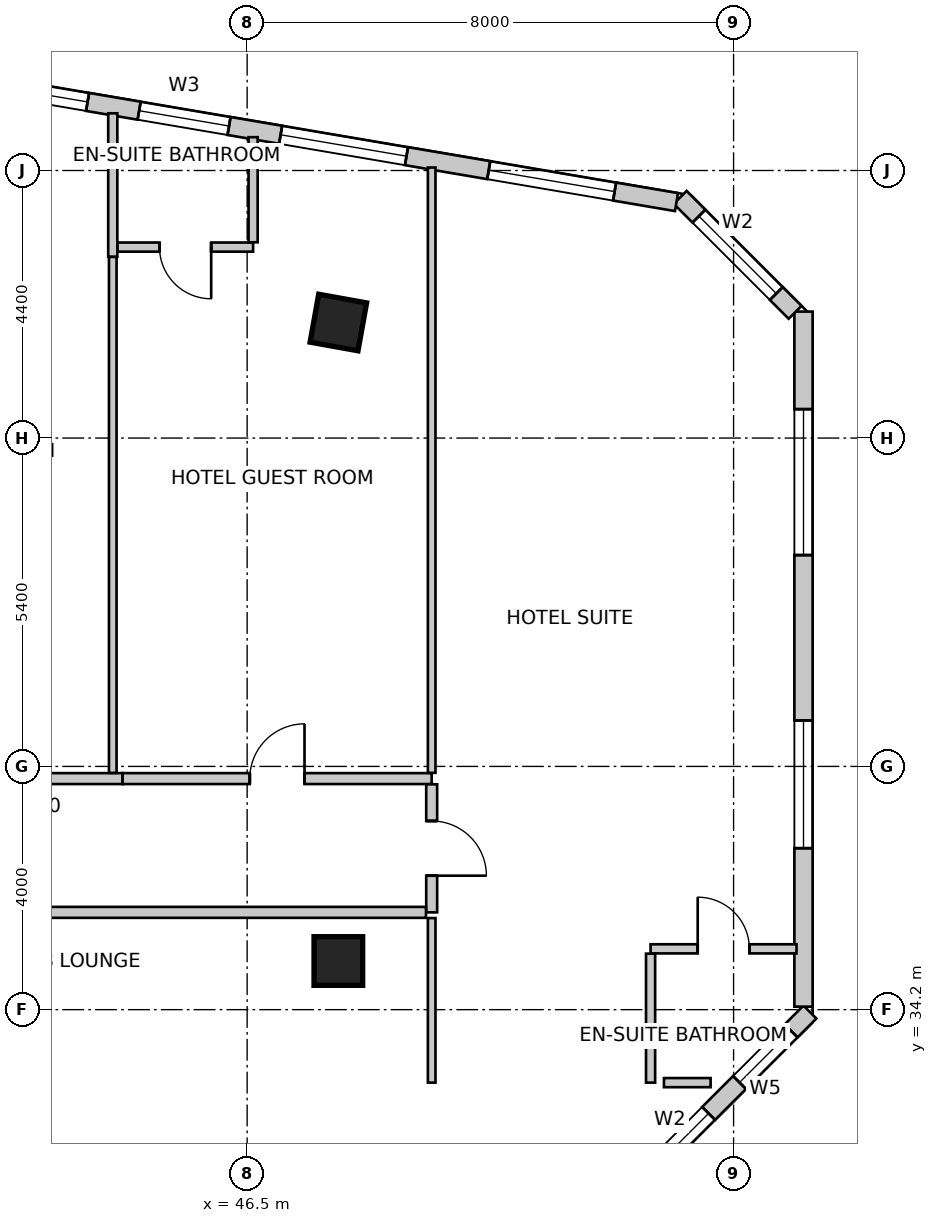
"""IFC4 building model, lengths in metres.
Left out: names, types, materials, properties, quantities, classifications, styles, units other than length and angle.
Written with IfcOpenShell. Run it as: python <this file> out.ifc"""

import sys

from ifc_helpers import new_model, si_unit, direction, frame, frame_2d, origin, origin_2d, place, context, subcontext, project, spatial, rectangle, extrude, source, transform, mapped, element, fill, save


model = new_model("IFC4")
c1 = context("Model", 3, precision=1e-05, world=origin(), true_north=direction((0.0, 1.0)))
c2 = subcontext(c1, "Body", "Model", "MODEL_VIEW")
j1 = project(units=[si_unit("LENGTHUNIT", "METRE"), si_unit("PLANEANGLEUNIT", "RADIAN")], contexts=[c1])
p1 = place(None, origin())
s1 = spatial("IfcSite", under=j1, at=p1, CompositionType="ELEMENT")
p2 = place(p1, origin())
s2 = spatial("IfcBuilding", under=s1, at=p2, CompositionType="ELEMENT")
p3 = place(p2, frame((0.0, 0.0, 114.2)))
s3 = spatial("IfcBuildingStorey", under=s2, at=p3, CompositionType="ELEMENT", Elevation=114.2)
m1 = source(origin(), c2, "Body", "SweptSolid", [
    extrude(rectangle(XDim=0.8, YDim=0.8, at=origin_2d()), origin(), (0.0, 0.0, 1.0), 3.6),
])
for number, where, z_axis, x_axis in (
    (1, (48.0, 45.5, 0.0), (0.0, 0.0, 1.0), (0.984, -0.177, 0.0)),
    (2, (48.0, 35.0, 0.0), (0.0, 0.0, 1.0), (1.0, 0.0, 0.0)),
):
    element("IfcColumn", number, at=place(p3, frame(where, z_axis=z_axis, x_axis=x_axis)), inside=s3, PredefinedType="COLUMN", context=c2, shape_type="MappedRepresentation", body=[
        mapped(m1, transform((0.0, 0.0, 0.0), scale=1.0)),
    ])
p4 = place(p3, frame((52.476, 30.88, 0.0), z_axis=(0.0, 0.0, 1.0), x_axis=(0.707106781187, 0.707106781187, 0.0)))
e3 = element("IfcWall", 3, at=p4, inside=s3, PredefinedType="SOLIDWALL", context=c2, shape_type="SweptSolid", body=[
    extrude(rectangle(XDim=4.639, YDim=0.3, at=frame_2d((2.319, 0.0))), origin(), (0.0, 0.0, 1.0), 3.35),
])
m2 = source(origin(), c2, "Body", "SweptSolid", [
    extrude(rectangle(XDim=1.8, YDim=2.1, at=frame_2d((0.9, 1.05))), frame((0.0, 0.16, 0.0), z_axis=(0.0, -1.0, 0.0), x_axis=(1.0, 0.0, 0.0)), (0.0, 0.0, 1.0), 0.32),
])
p5 = place(p4, frame((0.482, 0.0, 0.85)))
e4 = element("IfcOpeningElement", 4, at=p5, cuts=e3, PredefinedType="OPENING", context=c2, shape_type="MappedRepresentation", body=[
    mapped(m2, transform((0.0, 0.0, 0.0), scale=1.0)),
])
m3 = source(origin(), c2, "Body", "SweptSolid", [
    extrude(rectangle(XDim=1.2, YDim=1.6, at=frame_2d((0.6, 0.8))), frame((0.0, 0.16, 0.0), z_axis=(0.0, -1.0, 0.0), x_axis=(1.0, 0.0, 0.0)), (0.0, 0.0, 1.0), 0.32),
])
p6 = place(p4, frame((3.001, 0.0, 0.85)))
e5 = element("IfcOpeningElement", 5, at=p6, cuts=e3, PredefinedType="OPENING", context=c2, shape_type="MappedRepresentation", body=[
    mapped(m3, transform((0.0, 0.0, 0.0), scale=1.0)),
])
p7 = place(p3, frame((55.65, 34.249, 0.0), z_axis=(0.0, 0.0, 1.0), x_axis=(0.0, 1.0, 0.0)))
e6 = element("IfcWall", 6, at=p7, inside=s3, PredefinedType="SOLIDWALL", context=c2, shape_type="SweptSolid", body=[
    extrude(rectangle(XDim=11.431, YDim=0.3, at=frame_2d((5.715, 0.0))), origin(), (0.0, 0.0, 1.0), 3.35),
])
m4 = source(origin(), c2, "Body", "SweptSolid", [
    extrude(rectangle(XDim=2.1, YDim=2.0, at=frame_2d((1.05, 1.0))), frame((0.0, 0.16, 0.0), z_axis=(0.0, -1.0, 0.0), x_axis=(1.0, 0.0, 0.0)), (0.0, 0.0, 1.0), 0.32),
])
p8 = place(p7, frame((2.606, 0.0, 0.85)))
e7 = element("IfcOpeningElement", 7, at=p8, cuts=e6, PredefinedType="OPENING", context=c2, shape_type="MappedRepresentation", body=[
    mapped(m4, transform((0.0, 0.0, 0.0), scale=1.0)),
])
m5 = source(origin(), c2, "Body", "SweptSolid", [
    extrude(rectangle(XDim=2.4, YDim=2.2, at=frame_2d((1.2, 1.1))), frame((0.0, 0.16, 0.0), z_axis=(0.0, -1.0, 0.0), x_axis=(1.0, 0.0, 0.0)), (0.0, 0.0, 1.0), 0.32),
])
p9 = place(p7, frame((7.426, 0.0, 0.85)))
e8 = element("IfcOpeningElement", 8, at=p9, cuts=e6, PredefinedType="OPENING", context=c2, shape_type="MappedRepresentation", body=[
    mapped(m5, transform((0.0, 0.0, 0.0), scale=1.0)),
])
p10 = place(p3, frame((55.512, 45.668, 0.0), z_axis=(0.0, 0.0, 1.0), x_axis=(-0.707152443695, 0.707061115729, 0.0)))
e9 = element("IfcWall", 9, at=p10, inside=s3, PredefinedType="SOLIDWALL", context=c2, shape_type="SweptSolid", body=[
    extrude(rectangle(XDim=2.673, YDim=0.3, at=frame_2d((1.337, 0.0))), origin(), (0.0, 0.0, 1.0), 3.35),
])
p11 = place(p10, frame((0.437, 0.0, 0.85)))
e10 = element("IfcOpeningElement", 10, at=p11, cuts=e9, PredefinedType="OPENING", context=c2, shape_type="MappedRepresentation", body=[
    mapped(m2, transform((0.0, 0.0, 0.0), scale=1.0)),
])
p12 = place(p3, frame((53.561, 47.48, 0.0), z_axis=(0.0, 0.0, 1.0), x_axis=(-0.985845173895, 0.167658262868, 0.0)))
e11 = element("IfcWall", 11, at=p12, inside=s3, PredefinedType="SOLIDWALL", context=c2, shape_type="SweptSolid", body=[
    extrude(rectangle(XDim=32.132, YDim=0.3, at=frame_2d((16.066, 0.0))), origin(), (0.0, 0.0, 1.0), 3.35),
])
p13 = place(p12, frame((1.032, 0.0, 0.85)))
e12 = element("IfcOpeningElement", 12, at=p13, cuts=e11, PredefinedType="OPENING", context=c2, shape_type="MappedRepresentation", body=[
    mapped(m4, transform((0.0, 0.0, 0.0), scale=1.0)),
])
p14 = place(p12, frame((4.504, 0.0, 0.85)))
e13 = element("IfcOpeningElement", 13, at=p14, cuts=e11, PredefinedType="OPENING", context=c2, shape_type="MappedRepresentation", body=[
    mapped(m4, transform((0.0, 0.0, 0.0), scale=1.0)),
])
m6 = source(origin(), c2, "Body", "SweptSolid", [
    extrude(rectangle(XDim=1.5, YDim=1.8, at=frame_2d((0.75, 0.9))), frame((0.0, 0.16, 0.0), z_axis=(0.0, -1.0, 0.0), x_axis=(1.0, 0.0, 0.0)), (0.0, 0.0, 1.0), 0.32),
])
p15 = place(p12, frame((7.464, 0.0, 0.85)))
e14 = element("IfcOpeningElement", 14, at=p15, cuts=e11, PredefinedType="OPENING", context=c2, shape_type="MappedRepresentation", body=[
    mapped(m6, transform((0.0, 0.0, 0.0), scale=1.0)),
])
p16 = place(p12, frame((9.824, 0.0, 0.85)))
e15 = element("IfcOpeningElement", 15, at=p16, cuts=e11, PredefinedType="OPENING", context=c2, shape_type="MappedRepresentation", body=[
    mapped(m4, transform((0.0, 0.0, 0.0), scale=1.0)),
])
p17 = place(p12, frame((12.784, 0.0, 0.85)))
e16 = element("IfcOpeningElement", 16, at=p17, cuts=e11, PredefinedType="OPENING", context=c2, shape_type="MappedRepresentation", body=[
    mapped(m6, transform((0.0, 0.0, 0.0), scale=1.0)),
])
p18 = place(p12, frame((15.144, 0.0, 0.85)))
e17 = element("IfcOpeningElement", 17, at=p18, cuts=e11, PredefinedType="OPENING", context=c2, shape_type="MappedRepresentation", body=[
    mapped(m4, transform((0.0, 0.0, 0.0), scale=1.0)),
])
p19 = place(p12, frame((18.086, 0.0, 0.85)))
e18 = element("IfcOpeningElement", 18, at=p19, cuts=e11, PredefinedType="OPENING", context=c2, shape_type="MappedRepresentation", body=[
    mapped(m6, transform((0.0, 0.0, 0.0), scale=1.0)),
])
p20 = place(p12, frame((20.459, 0.0, 0.85)))
e19 = element("IfcOpeningElement", 19, at=p20, cuts=e11, PredefinedType="OPENING", context=c2, shape_type="MappedRepresentation", body=[
    mapped(m4, transform((0.0, 0.0, 0.0), scale=1.0)),
])
p21 = place(p12, frame((25.55, 0.0, 0.85)))
e20 = element("IfcOpeningElement", 20, at=p21, cuts=e11, PredefinedType="OPENING", context=c2, shape_type="MappedRepresentation", body=[
    mapped(m4, transform((0.0, 0.0, 0.0), scale=1.0)),
])
m7 = source(origin(), c2, "Body", "SweptSolid", [
    extrude(rectangle(XDim=0.9, YDim=1.6, at=frame_2d((0.45, 0.8))), frame((0.0, 0.16, 0.0), z_axis=(0.0, -1.0, 0.0), x_axis=(1.0, 0.0, 0.0)), (0.0, 0.0, 1.0), 0.32),
])
p22 = place(p12, frame((30.65, 0.0, 0.85)))
e21 = element("IfcOpeningElement", 21, at=p22, cuts=e11, PredefinedType="OPENING", context=c2, shape_type="MappedRepresentation", body=[
    mapped(m7, transform((0.0, 0.0, 0.0), scale=1.0)),
])
p23 = place(p3, frame((39.207, 38.0, 0.0), z_axis=(0.0, 0.0, 1.0), x_axis=(1.0, 0.0, 0.0)))
e22 = element("IfcWall", 22, at=p23, inside=s3, PredefinedType="PARTITIONING", context=c2, shape_type="SweptSolid", body=[
    extrude(rectangle(XDim=5.243, YDim=0.18, at=frame_2d((2.622, 0.0))), origin(), (0.0, 0.0, 1.0), 2.788),
])
m8 = source(origin(), c2, "Body", "SweptSolid", [
    extrude(rectangle(XDim=0.9, YDim=2.15, at=frame_2d((0.45, 1.075))), frame((0.0, 0.1, 0.0), z_axis=(0.0, -1.0, 0.0), x_axis=(1.0, 0.0, 0.0)), (0.0, 0.0, 1.0), 0.2),
])
p24 = place(p23, frame((2.111, 0.0, 0.0)))
e23 = element("IfcOpeningElement", 23, at=p24, cuts=e22, PredefinedType="OPENING", context=c2, shape_type="MappedRepresentation", body=[
    mapped(m8, transform((0.0, 0.0, 0.0), scale=1.0)),
])
p25 = place(p3, frame((44.452, 38.0, 0.0), z_axis=(0.0, 0.0, 1.0), x_axis=(1.0, 0.0, 0.0)))
e24 = element("IfcWall", 24, at=p25, inside=s3, PredefinedType="PARTITIONING", context=c2, shape_type="SweptSolid", body=[
    extrude(rectangle(XDim=5.083, YDim=0.18, at=frame_2d((2.542, 0.0))), origin(), (0.0, 0.0, 1.0), 2.803),
])
p26 = place(p25, frame((2.092, 0.0, 0.0)))
e25 = element("IfcOpeningElement", 25, at=p26, cuts=e24, PredefinedType="OPENING", context=c2, shape_type="MappedRepresentation", body=[
    mapped(m8, transform((0.0, 0.0, 0.0), scale=1.0)),
])
p27 = place(p3, frame((49.535, 37.906, 0.0), z_axis=(0.0, 0.0, 1.0), x_axis=(0.0, -1.0, 0.0)))
e26 = element("IfcWall", 26, at=p27, inside=s3, PredefinedType="PARTITIONING", context=c2, shape_type="SweptSolid", body=[
    extrude(rectangle(XDim=2.106, YDim=0.18, at=frame_2d((1.053, 0.0))), origin(), (0.0, 0.0, 1.0), 3.35),
])
p28 = place(p27, frame((0.603, 0.0, 0.0)))
e27 = element("IfcOpeningElement", 27, at=p28, cuts=e26, PredefinedType="OPENING", context=c2, shape_type="MappedRepresentation", body=[
    mapped(m8, transform((0.0, 0.0, 0.0), scale=1.0)),
])
p29 = place(p3, frame((49.441, 35.8, 0.0), z_axis=(0.0, 0.0, 1.0), x_axis=(-1.0, 0.0, 0.0)))
e28 = element("IfcWall", 28, at=p29, inside=s3, PredefinedType="PARTITIONING", context=c2, shape_type="SweptSolid", body=[
    extrude(rectangle(XDim=15.641, YDim=0.18, at=frame_2d((7.82, 0.0))), origin(), (0.0, 0.0, 1.0), 2.788),
])
p30 = place(p29, frame((7.371, 0.0, 0.0)))
e29 = element("IfcOpeningElement", 29, at=p30, cuts=e28, PredefinedType="OPENING", context=c2, shape_type="MappedRepresentation", body=[
    mapped(m8, transform((0.0, 0.0, 0.0), scale=1.0)),
])
p31 = place(p3, frame((44.29, 48.94, 0.0), z_axis=(0.0, 0.0, 1.0), x_axis=(0.0, -1.0, 0.0)))
e30 = element("IfcWall", 30, at=p31, inside=s3, PredefinedType="PARTITIONING", context=c2, shape_type="SweptSolid", body=[
    extrude(rectangle(XDim=2.36, YDim=0.15, at=frame_2d((1.18, 0.0))), origin(), (0.0, 0.0, 1.0), 3.35),
])
p32 = place(p3, frame((44.29, 46.579, 0.0), z_axis=(0.0, 0.0, 1.0), x_axis=(0.0, -1.0, 0.0)))
e31 = element("IfcWall", 31, at=p32, inside=s3, PredefinedType="PARTITIONING", context=c2, shape_type="SweptSolid", body=[
    extrude(rectangle(XDim=8.485, YDim=0.125, at=frame_2d((4.242, 0.0))), origin(), (0.0, 0.0, 1.0), 2.492),
])
p33 = place(p3, frame((46.598, 46.74, 0.0), z_axis=(0.0, 0.0, 1.0), x_axis=(-1.0, 0.0, 0.0)))
e32 = element("IfcWall", 32, at=p33, inside=s3, PredefinedType="PARTITIONING", context=c2, shape_type="SweptSolid", body=[
    extrude(rectangle(XDim=2.229, YDim=0.15, at=frame_2d((1.115, 0.0))), origin(), (0.0, 0.0, 1.0), 3.35),
])
m9 = source(origin(), c2, "Body", "SweptSolid", [
    extrude(rectangle(XDim=0.85, YDim=2.15, at=frame_2d((0.425, 1.075))), frame((0.0, 0.085, 0.0), z_axis=(0.0, -1.0, 0.0), x_axis=(1.0, 0.0, 0.0)), (0.0, 0.0, 1.0), 0.17),
])
p34 = place(p33, frame((0.689, 0.0, 0.0)))
e33 = element("IfcOpeningElement", 33, at=p34, cuts=e32, PredefinedType="OPENING", context=c2, shape_type="MappedRepresentation", body=[
    mapped(m9, transform((0.0, 0.0, 0.0), scale=1.0)),
])
p35 = place(p3, frame((46.598, 48.548, 0.0), z_axis=(0.0, 0.0, 1.0), x_axis=(0.0, -1.0, 0.0)))
e34 = element("IfcWall", 34, at=p35, inside=s3, PredefinedType="PARTITIONING", context=c2, shape_type="SweptSolid", body=[
    extrude(rectangle(XDim=1.729, YDim=0.15, at=frame_2d((0.864, 0.0))), origin(), (0.0, 0.0, 1.0), 3.35),
])
p36 = place(p3, frame((49.535, 48.049, 0.0), z_axis=(0.0, 0.0, 1.0), x_axis=(0.0, -1.0, 0.0)))
e35 = element("IfcWall", 35, at=p36, inside=s3, PredefinedType="PARTITIONING", context=c2, shape_type="SweptSolid", body=[
    extrude(rectangle(XDim=9.955, YDim=0.125, at=frame_2d((4.977, 0.0))), origin(), (0.0, 0.0, 1.0), 3.35),
])
p37 = place(p3, frame((53.135, 35.2, 0.0), z_axis=(0.0, 0.0, 1.0), x_axis=(1.0, 0.0, 0.0)))
e36 = element("IfcWall", 36, at=p37, inside=s3, PredefinedType="PARTITIONING", context=c2, shape_type="SweptSolid", body=[
    extrude(rectangle(XDim=2.4, YDim=0.15, at=frame_2d((1.2, 0.0))), origin(), (0.0, 0.0, 1.0), 3.35),
])
p38 = place(p37, frame((0.775, 0.0, 0.0)))
e37 = element("IfcOpeningElement", 37, at=p38, cuts=e36, PredefinedType="OPENING", context=c2, shape_type="MappedRepresentation", body=[
    mapped(m9, transform((0.0, 0.0, 0.0), scale=1.0)),
])
p39 = place(p3, frame((53.135, 33.0, 0.0), z_axis=(0.0, 0.0, 1.0), x_axis=(0.0, 1.0, 0.0)))
e38 = element("IfcWall", 38, at=p39, inside=s3, PredefinedType="PARTITIONING", context=c2, shape_type="SweptSolid", body=[
    extrude(rectangle(XDim=2.121, YDim=0.15, at=frame_2d((1.061, 0.0))), origin(), (0.0, 0.0, 1.0), 3.35),
])
p40 = place(p3, frame((49.535, 33.0, 0.0), z_axis=(0.0, 0.0, 1.0), x_axis=(0.0, 1.0, 0.0)))
e39 = element("IfcWall", 39, at=p40, inside=s3, PredefinedType="PARTITIONING", context=c2, shape_type="SweptSolid", body=[
    extrude(rectangle(XDim=2.706, YDim=0.125, at=frame_2d((1.353, 0.0))), origin(), (0.0, 0.0, 1.0), 3.35),
])
p41 = place(p3, frame((54.122, 33.0, 0.0), z_axis=(0.0, 0.0, 1.0), x_axis=(-1.0, 0.0, 0.0)))
e40 = element("IfcWall", 40, at=p41, inside=s3, PredefinedType="PARTITIONING", context=c2, shape_type="SweptSolid", body=[
    extrude(rectangle(XDim=0.767, YDim=0.15, at=frame_2d((0.384, 0.0))), origin(), (0.0, 0.0, 1.0), 3.35),
])
m10 = source(origin(), c2, "Body", "SweptSolid", [
    extrude(rectangle(XDim=1.8, YDim=2.1, at=frame_2d((0.9, 1.05))), frame((0.0, -0.015, 0.0), z_axis=(0.0, -1.0, 0.0), x_axis=(1.0, 0.0, 0.0)), (0.0, 0.0, 1.0), 0.06),
])
p42 = place(p5, origin())
e41 = element("IfcWindow", 41, at=p42, inside=s3, PartitioningType="SINGLE_PANEL", PredefinedType="WINDOW", context=c2, shape_type="MappedRepresentation", body=[
    mapped(m10, transform((0.0, 0.0, 0.0), scale=1.0)),
])
fill(e4, e41)
m11 = source(origin(), c2, "Body", "SweptSolid", [
    extrude(rectangle(XDim=1.2, YDim=1.6, at=frame_2d((0.6, 0.8))), frame((0.0, -0.015, 0.0), z_axis=(0.0, -1.0, 0.0), x_axis=(1.0, 0.0, 0.0)), (0.0, 0.0, 1.0), 0.06),
])
p43 = place(p6, origin())
e42 = element("IfcWindow", 42, at=p43, inside=s3, PartitioningType="SINGLE_PANEL", PredefinedType="WINDOW", context=c2, shape_type="MappedRepresentation", body=[
    mapped(m11, transform((0.0, 0.0, 0.0), scale=1.0)),
])
fill(e5, e42)
m12 = source(origin(), c2, "Body", "SweptSolid", [
    extrude(rectangle(XDim=2.1, YDim=2.0, at=frame_2d((1.05, 1.0))), frame((0.0, -0.015, 0.0), z_axis=(0.0, -1.0, 0.0), x_axis=(1.0, 0.0, 0.0)), (0.0, 0.0, 1.0), 0.06),
])
p44 = place(p8, origin())
e43 = element("IfcWindow", 43, at=p44, inside=s3, PartitioningType="SINGLE_PANEL", PredefinedType="WINDOW", context=c2, shape_type="MappedRepresentation", body=[
    mapped(m12, transform((0.0, 0.0, 0.0), scale=1.0)),
])
fill(e7, e43)
m13 = source(origin(), c2, "Body", "SweptSolid", [
    extrude(rectangle(XDim=2.4, YDim=2.2, at=frame_2d((1.2, 1.1))), frame((0.0, -0.015, 0.0), z_axis=(0.0, -1.0, 0.0), x_axis=(1.0, 0.0, 0.0)), (0.0, 0.0, 1.0), 0.06),
])
p45 = place(p9, origin())
e44 = element("IfcWindow", 44, at=p45, inside=s3, PartitioningType="SINGLE_PANEL", PredefinedType="WINDOW", context=c2, shape_type="MappedRepresentation", body=[
    mapped(m13, transform((0.0, 0.0, 0.0), scale=1.0)),
])
fill(e8, e44)
p46 = place(p11, origin())
e45 = element("IfcWindow", 45, at=p46, inside=s3, PartitioningType="SINGLE_PANEL", PredefinedType="WINDOW", context=c2, shape_type="MappedRepresentation", body=[
    mapped(m10, transform((0.0, 0.0, 0.0), scale=1.0)),
])
fill(e10, e45)
p47 = place(p13, origin())
e46 = element("IfcWindow", 46, at=p47, inside=s3, PartitioningType="SINGLE_PANEL", PredefinedType="WINDOW", context=c2, shape_type="MappedRepresentation", body=[
    mapped(m12, transform((0.0, 0.0, 0.0), scale=1.0)),
])
fill(e12, e46)
p48 = place(p14, origin())
e47 = element("IfcWindow", 47, at=p48, inside=s3, PartitioningType="SINGLE_PANEL", PredefinedType="WINDOW", context=c2, shape_type="MappedRepresentation", body=[
    mapped(m12, transform((0.0, 0.0, 0.0), scale=1.0)),
])
fill(e13, e47)
m14 = source(origin(), c2, "Body", "SweptSolid", [
    extrude(rectangle(XDim=1.5, YDim=1.8, at=frame_2d((0.75, 0.9))), frame((0.0, -0.015, 0.0), z_axis=(0.0, -1.0, 0.0), x_axis=(1.0, 0.0, 0.0)), (0.0, 0.0, 1.0), 0.06),
])
p49 = place(p15, origin())
e48 = element("IfcWindow", 48, at=p49, inside=s3, PartitioningType="SINGLE_PANEL", PredefinedType="WINDOW", context=c2, shape_type="MappedRepresentation", body=[
    mapped(m14, transform((0.0, 0.0, 0.0), scale=1.0)),
])
fill(e14, e48)
p50 = place(p16, origin())
e49 = element("IfcWindow", 49, at=p50, inside=s3, PartitioningType="SINGLE_PANEL", PredefinedType="WINDOW", context=c2, shape_type="MappedRepresentation", body=[
    mapped(m12, transform((0.0, 0.0, 0.0), scale=1.0)),
])
fill(e15, e49)
m15 = source(origin(), c2, "Body", "SweptSolid", [
    extrude(rectangle(XDim=0.85, YDim=2.15, at=frame_2d((0.425, 1.075))), frame((0.0, 0.025, 0.0), z_axis=(0.0, -1.0, 0.0), x_axis=(1.0, 0.0, 0.0)), (0.0, 0.0, 1.0), 0.05),
])
p51 = place(p34, origin())
e50 = element("IfcDoor", 50, at=p51, inside=s3, OperationType="SINGLE_SWING_LEFT", PredefinedType="DOOR", context=c2, shape_type="MappedRepresentation", body=[
    mapped(m15, transform((0.0, 0.0, 0.0), scale=1.0)),
])
fill(e33, e50)
m16 = source(origin(), c2, "Body", "SweptSolid", [
    extrude(rectangle(XDim=0.9, YDim=2.15, at=frame_2d((0.45, 1.075))), frame((0.0, 0.025, 0.0), z_axis=(0.0, -1.0, 0.0), x_axis=(1.0, 0.0, 0.0)), (0.0, 0.0, 1.0), 0.05),
])
p52 = place(p26, origin())
e51 = element("IfcDoor", 51, at=p52, inside=s3, OperationType="SINGLE_SWING_RIGHT", PredefinedType="DOOR", context=c2, shape_type="MappedRepresentation", body=[
    mapped(m16, transform((0.0, 0.0, 0.0), scale=1.0)),
])
fill(e25, e51)
p53 = place(p38, origin())
e52 = element("IfcDoor", 52, at=p53, inside=s3, OperationType="SINGLE_SWING_LEFT", PredefinedType="DOOR", context=c2, shape_type="MappedRepresentation", body=[
    mapped(m15, transform((0.0, 0.0, 0.0), scale=1.0)),
])
fill(e37, e52)
p54 = place(p28, origin())
e53 = element("IfcDoor", 53, at=p54, inside=s3, OperationType="SINGLE_SWING_RIGHT", PredefinedType="DOOR", context=c2, shape_type="MappedRepresentation", body=[
    mapped(m16, transform((0.0, 0.0, 0.0), scale=1.0)),
])
fill(e27, e53)
save(model, sys.argv[1])
